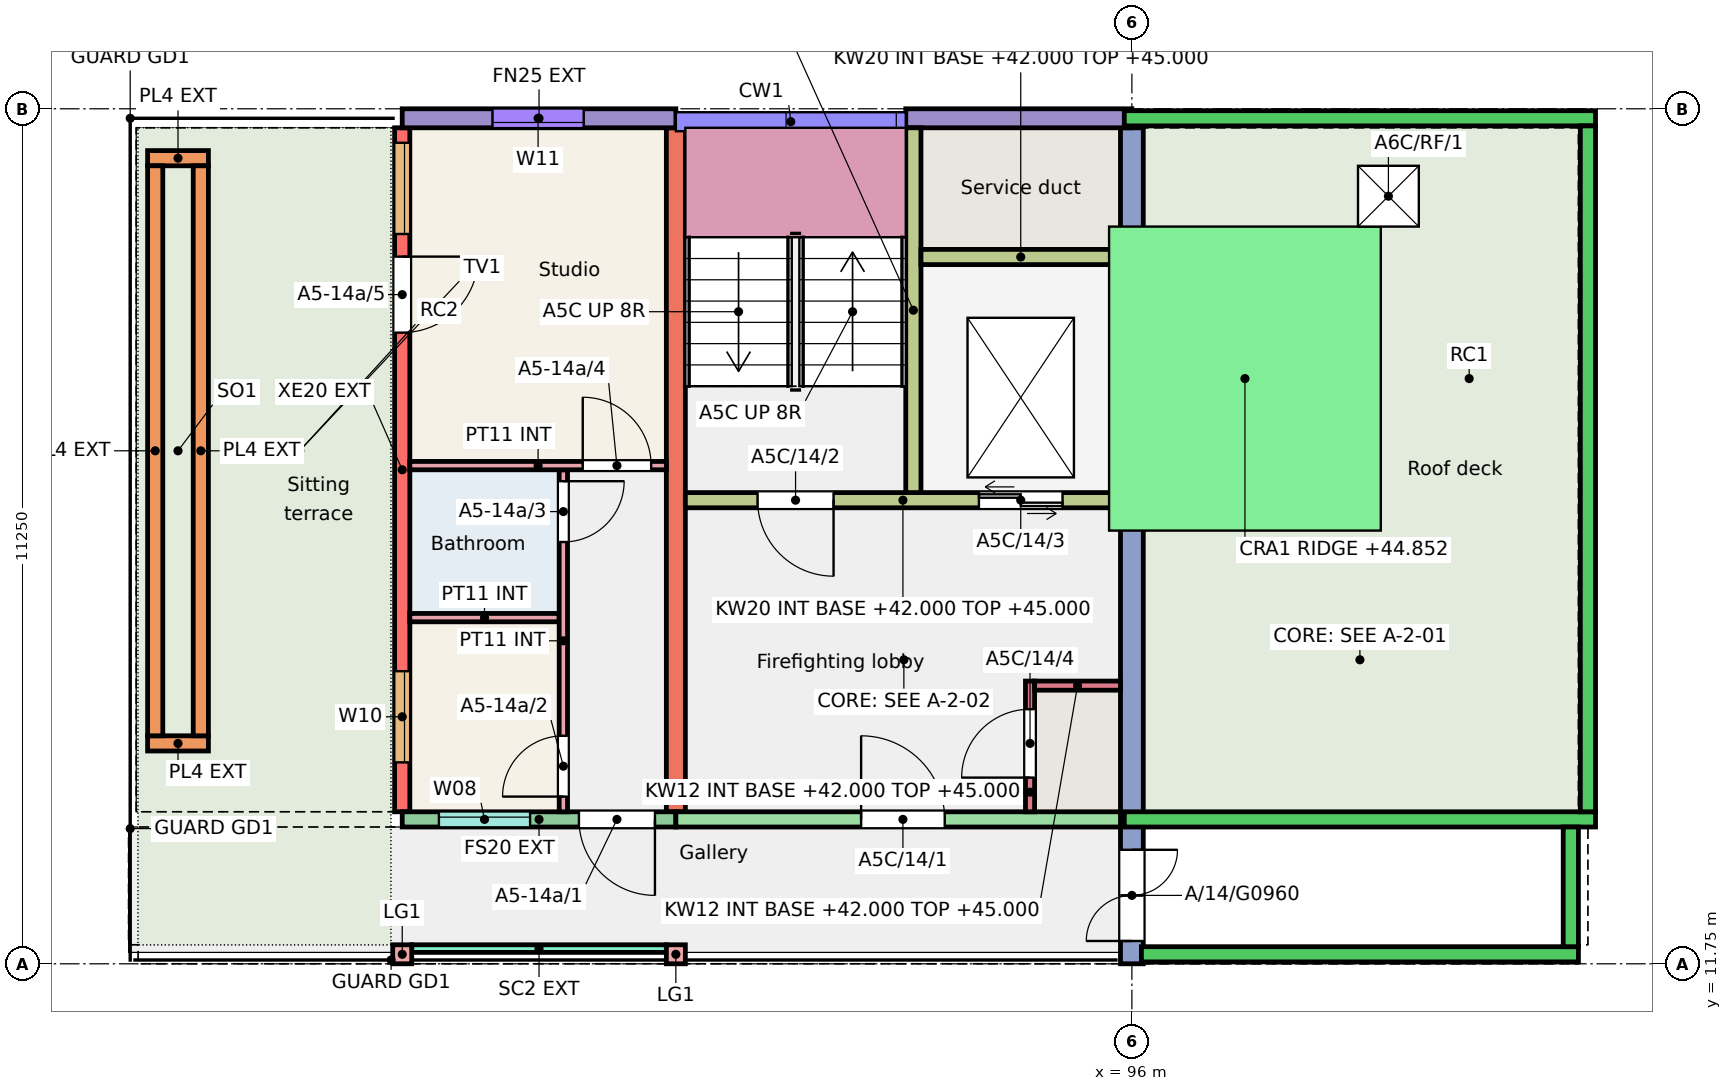
"""IFC4 building model, lengths in metres.
Left out: names, types, materials, properties, quantities, classifications, styles, units other than length and angle.
Written with IfcOpenShell. Run it as: python <this file> out.ifc"""

import sys

from ifc_helpers import new_model, si_unit, direction, frame, frame_2d, origin, origin_2d, place, context, subcontext, project, spatial, rectangle, extrude, element, fill, save


model = new_model("IFC4")
c1 = context("Model", 3, precision=1e-05, world=origin(), true_north=direction((0.0, 1.0)))
c2 = subcontext(c1, "Body", "Model", "MODEL_VIEW")
j1 = project(units=[si_unit("LENGTHUNIT", "METRE"), si_unit("PLANEANGLEUNIT", "RADIAN")], contexts=[c1])
p1 = place(None, origin())
s1 = spatial("IfcSite", under=j1, at=p1, CompositionType="ELEMENT")
p2 = place(p1, origin())
s2 = spatial("IfcBuilding", under=s1, at=p2, CompositionType="ELEMENT")
p3 = place(p2, frame((0.0, 0.0, 42.0)))
s3 = spatial("IfcBuildingStorey", under=s2, at=p3, CompositionType="ELEMENT", Elevation=42.0)
p4 = place(p3, frame((86.4, 13.75, 0.0), z_axis=(0.0, 0.0, 1.0), x_axis=(0.0, 1.0, 0.0)))
e1 = element("IfcWall", 1, at=p4, inside=s3, PredefinedType="SHEAR", context=c2, shape_type="SweptSolid", body=[
    extrude(rectangle(XDim=9.0, YDim=0.2, at=frame_2d((4.5, 0.0))), origin(), (0.0, 0.0, 1.0), 3.0),
])
p5 = place(p4, frame((0.65, 0.0, 0.9)))
e2 = element("IfcOpeningElement", 2, at=p5, cuts=e1, PredefinedType="OPENING", context=c2, shape_type="SweptSolid", body=[
    extrude(rectangle(XDim=1.2, YDim=1.5, at=frame_2d((0.6, 0.75))), frame((0.0, 0.11, 0.0), z_axis=(0.0, -1.0, 0.0), x_axis=(1.0, 0.0, 0.0)), (0.0, 0.0, 1.0), 0.22),
])
p6 = place(p4, frame((7.603, 0.0, 0.9)))
e3 = element("IfcOpeningElement", 3, at=p6, cuts=e1, PredefinedType="OPENING", context=c2, shape_type="SweptSolid", body=[
    extrude(rectangle(XDim=1.2, YDim=1.5, at=frame_2d((0.6, 0.75))), frame((0.0, 0.11, 0.0), z_axis=(0.0, -1.0, 0.0), x_axis=(1.0, 0.0, 0.0)), (0.0, 0.0, 1.0), 0.22),
])
p7 = place(p4, frame((6.305, 0.0, 0.0)))
e4 = element("IfcOpeningElement", 4, at=p7, cuts=e1, PredefinedType="OPENING", context=c2, shape_type="SweptSolid", body=[
    extrude(rectangle(XDim=1.0, YDim=2.1, at=frame_2d((0.5, 1.05))), frame((0.0, 0.11, 0.0), z_axis=(0.0, -1.0, 0.0), x_axis=(1.0, 0.0, 0.0)), (0.0, 0.0, 1.0), 0.22),
])
p8 = place(p3, frame((90.0, 13.75, 0.0), z_axis=(0.0, 0.0, 1.0), x_axis=(0.0, 1.0, 0.0)))
e5 = element("IfcWall", 5, at=p8, inside=s3, PredefinedType="SHEAR", context=c2, shape_type="SweptSolid", body=[
    extrude(rectangle(XDim=9.0, YDim=0.25, at=frame_2d((4.5, 0.0))), origin(), (0.0, 0.0, 1.0), 3.0),
])
p9 = place(p3, frame((96.0, 11.75, 0.0), z_axis=(0.0, 0.0, 1.0), x_axis=(0.0, 1.0, 0.0)))
e6 = element("IfcWall", 6, at=p9, inside=s3, PredefinedType="SHEAR", context=c2, shape_type="SweptSolid", body=[
    extrude(rectangle(XDim=11.0, YDim=0.3, at=frame_2d((5.5, 0.0))), origin(), (0.0, 0.0, 1.0), 3.0),
])
p10 = place(p9, frame((0.3, 0.0, 0.0)))
e7 = element("IfcOpeningElement", 7, at=p10, cuts=e6, PredefinedType="OPENING", context=c2, shape_type="SweptSolid", body=[
    extrude(rectangle(XDim=1.2, YDim=2.1, at=frame_2d((0.6, 1.05))), frame((0.0, 0.16, 0.0), z_axis=(0.0, -1.0, 0.0), x_axis=(1.0, 0.0, 0.0)), (0.0, 0.0, 1.0), 0.32),
])
p11 = place(p3, frame((86.4, 22.875, 0.0), z_axis=(0.0, 0.0, 1.0), x_axis=(1.0, 0.0, 0.0)))
e8 = element("IfcWall", 8, at=p11, inside=s3, PredefinedType="SOLIDWALL", context=c2, shape_type="SweptSolid", body=[
    extrude(rectangle(XDim=3.6, YDim=0.25, at=frame_2d((1.8, 0.0))), origin(), (0.0, 0.0, 1.0), 3.0),
])
p12 = place(p11, frame((1.188, 0.0, 0.8)))
e9 = element("IfcOpeningElement", 9, at=p12, cuts=e8, PredefinedType="OPENING", context=c2, shape_type="SweptSolid", body=[
    extrude(rectangle(XDim=1.2, YDim=1.6, at=frame_2d((0.6, 0.8))), frame((0.0, 0.135, 0.0), z_axis=(0.0, -1.0, 0.0), x_axis=(1.0, 0.0, 0.0)), (0.0, 0.0, 1.0), 0.27),
])
p13 = place(p3, frame((86.4, 13.65, 0.0), z_axis=(0.0, 0.0, 1.0), x_axis=(1.0, 0.0, 0.0)))
e10 = element("IfcWall", 10, at=p13, inside=s3, PredefinedType="SOLIDWALL", context=c2, shape_type="SweptSolid", body=[
    extrude(rectangle(XDim=3.6, YDim=0.2, at=frame_2d((1.8, 0.0))), origin(), (0.0, 0.0, 1.0), 3.0),
])
p14 = place(p13, frame((0.482, 0.0, 1.1)))
e11 = element("IfcOpeningElement", 11, at=p14, cuts=e10, PredefinedType="OPENING", context=c2, shape_type="SweptSolid", body=[
    extrude(rectangle(XDim=1.2, YDim=1.3, at=frame_2d((0.6, 0.65))), frame((0.0, 0.11, 0.0), z_axis=(0.0, -1.0, 0.0), x_axis=(1.0, 0.0, 0.0)), (0.0, 0.0, 1.0), 0.22),
])
p15 = place(p13, frame((2.325, 0.0, 0.0)))
e12 = element("IfcOpeningElement", 12, at=p15, cuts=e10, PredefinedType="OPENING", context=c2, shape_type="SweptSolid", body=[
    extrude(rectangle(XDim=1.0, YDim=2.1, at=frame_2d((0.5, 1.05))), frame((0.0, 0.11, 0.0), z_axis=(0.0, -1.0, 0.0), x_axis=(1.0, 0.0, 0.0)), (0.0, 0.0, 1.0), 0.22),
])
p16 = place(p3, frame((93.025, 22.875, 0.0), z_axis=(0.0, 0.0, 1.0), x_axis=(1.0, 0.0, 0.0)))
e13 = element("IfcWall", 13, at=p16, inside=s3, PredefinedType="SOLIDWALL", context=c2, shape_type="SweptSolid", body=[
    extrude(rectangle(XDim=2.975, YDim=0.25, at=frame_2d((1.488, 0.0))), origin(), (0.0, 0.0, 1.0), 3.0),
])
p17 = place(p3, frame((90.0, 13.65, 0.0), z_axis=(0.0, 0.0, 1.0), x_axis=(1.0, 0.0, 0.0)))
e14 = element("IfcWall", 14, at=p17, inside=s3, PredefinedType="SHEAR", context=c2, shape_type="SweptSolid", body=[
    extrude(rectangle(XDim=5.85, YDim=0.2, at=frame_2d((2.925, 0.0))), origin(), (0.0, 0.0, 1.0), 3.0),
])
p18 = place(p17, frame((2.438, 0.0, 0.0)))
e15 = element("IfcOpeningElement", 15, at=p18, cuts=e14, PredefinedType="OPENING", context=c2, shape_type="SweptSolid", body=[
    extrude(rectangle(XDim=1.1, YDim=2.1, at=frame_2d((0.55, 1.05))), frame((0.0, 0.11, 0.0), z_axis=(0.0, -1.0, 0.0), x_axis=(1.0, 0.0, 0.0)), (0.0, 0.0, 1.0), 0.22),
])
p19 = place(p3, frame((90.125, 17.85, 0.0), z_axis=(0.0, 0.0, 1.0), x_axis=(1.0, 0.0, 0.0)))
e16 = element("IfcWall", 16, at=p19, inside=s3, PredefinedType="SHEAR", context=c2, shape_type="SweptSolid", body=[
    extrude(rectangle(XDim=5.725, YDim=0.2, at=frame_2d((2.863, 0.0))), origin(), (0.0, 0.0, 1.0), 3.0),
])
p20 = place(p19, frame((0.95, 0.0, 0.0)))
e17 = element("IfcOpeningElement", 17, at=p20, cuts=e16, PredefinedType="OPENING", context=c2, shape_type="SweptSolid", body=[
    extrude(rectangle(XDim=1.0, YDim=2.1, at=frame_2d((0.5, 1.05))), frame((0.0, 0.11, 0.0), z_axis=(0.0, -1.0, 0.0), x_axis=(1.0, 0.0, 0.0)), (0.0, 0.0, 1.0), 0.22),
])
p21 = place(p19, frame((3.863, 0.0, 0.0)))
e18 = element("IfcOpeningElement", 18, at=p21, cuts=e16, PredefinedType="OPENING", context=c2, shape_type="SweptSolid", body=[
    extrude(rectangle(XDim=1.1, YDim=2.1, at=frame_2d((0.55, 1.05))), frame((0.0, 0.11, 0.0), z_axis=(0.0, -1.0, 0.0), x_axis=(1.0, 0.0, 0.0)), (0.0, 0.0, 1.0), 0.22),
])
p22 = place(p3, frame((93.125, 17.95, 0.0), z_axis=(0.0, 0.0, 1.0), x_axis=(0.0, 1.0, 0.0)))
e19 = element("IfcWall", 19, at=p22, inside=s3, PredefinedType="SHEAR", context=c2, shape_type="SweptSolid", body=[
    extrude(rectangle(XDim=4.8, YDim=0.2, at=frame_2d((2.4, 0.0))), origin(), (0.0, 0.0, 1.0), 3.0),
])
p23 = place(p3, frame((93.225, 21.05, 0.0), z_axis=(0.0, 0.0, 1.0), x_axis=(1.0, 0.0, 0.0)))
e20 = element("IfcWall", 20, at=p23, inside=s3, PredefinedType="SHEAR", context=c2, shape_type="SweptSolid", body=[
    extrude(rectangle(XDim=2.625, YDim=0.2, at=frame_2d((1.312, 0.0))), origin(), (0.0, 0.0, 1.0), 3.0),
])
p24 = place(p3, frame((94.66, 13.75, 0.0), z_axis=(0.0, 0.0, 1.0), x_axis=(0.0, 1.0, 0.0)))
e21 = element("IfcWall", 21, at=p24, inside=s3, PredefinedType="SHEAR", context=c2, shape_type="SweptSolid", body=[
    extrude(rectangle(XDim=1.72, YDim=0.12, at=frame_2d((0.86, 0.0))), origin(), (0.0, 0.0, 1.0), 3.0),
])
p25 = place(p24, frame((0.45, 0.0, 0.0)))
e22 = element("IfcOpeningElement", 22, at=p25, cuts=e21, PredefinedType="OPENING", context=c2, shape_type="SweptSolid", body=[
    extrude(rectangle(XDim=0.9, YDim=2.1, at=frame_2d((0.45, 1.05))), frame((0.0, 0.07, 0.0), z_axis=(0.0, -1.0, 0.0), x_axis=(1.0, 0.0, 0.0)), (0.0, 0.0, 1.0), 0.14),
])
p26 = place(p3, frame((94.72, 15.41, 0.0), z_axis=(0.0, 0.0, 1.0), x_axis=(1.0, 0.0, 0.0)))
e23 = element("IfcWall", 23, at=p26, inside=s3, PredefinedType="SHEAR", context=c2, shape_type="SweptSolid", body=[
    extrude(rectangle(XDim=1.13, YDim=0.12, at=frame_2d((0.565, 0.0))), origin(), (0.0, 0.0, 1.0), 3.0),
])
for number, where, z_axis, x_axis in (
    (24, (86.4, 11.875, 0.0), (0.0, 0.0, 1.0), (1.0, 0.0, 0.0)),
    (25, (90.0, 11.875, 0.0), (0.0, 0.0, 1.0), (1.0, 0.0, 0.0)),
):
    element("IfcColumn", number, at=place(p3, frame(where, z_axis=z_axis, x_axis=x_axis)), inside=s3, PredefinedType="COLUMN", context=c2, shape_type="SweptSolid", body=[
        extrude(rectangle(XDim=0.25, YDim=0.25, at=origin_2d()), origin(), (0.0, 0.0, 1.0), 3.0),
    ])
for number, where, z_axis, x_axis in (
    (26, (96.15, 17.85, 0.0), (0.0, 0.0, 1.0), (1.0, 0.0, 0.0)),
    (27, (96.15, 21.05, 0.0), (0.0, 0.0, 1.0), (1.0, 0.0, 0.0)),
):
    element("IfcWall", number, at=place(p3, frame(where, z_axis=z_axis, x_axis=x_axis)), inside=s3, PredefinedType="SHEAR", context=c2, shape_type="SweptSolid", body=[
        extrude(rectangle(XDim=2.825, YDim=0.2, at=frame_2d((1.413, 0.0))), origin(), (0.0, 0.0, 1.0), 1.5),
    ])
p27 = place(p3, frame((98.875, 17.95, 0.0), z_axis=(0.0, 0.0, 1.0), x_axis=(0.0, 1.0, 0.0)))
e28 = element("IfcWall", 28, at=p27, inside=s3, PredefinedType="SHEAR", context=c2, shape_type="SweptSolid", body=[
    extrude(rectangle(XDim=3.0, YDim=0.2, at=frame_2d((1.5, 0.0))), origin(), (0.0, 0.0, 1.0), 1.5),
])
for number, where, z_axis, x_axis in (
    (29, (95.9, 22.875, 0.0), (0.0, 0.0, 1.0), (1.0, 0.0, 0.0)),
    (30, (95.9, 13.65, 0.0), (0.0, 0.0, 1.0), (1.0, 0.0, 0.0)),
):
    element("IfcWall", number, at=place(p3, frame(where, z_axis=z_axis, x_axis=x_axis)), inside=s3, PredefinedType="PARAPET", context=c2, shape_type="SweptSolid", body=[
        extrude(rectangle(XDim=6.2, YDim=0.2, at=frame_2d((3.1, 0.0))), origin(), (0.0, 0.0, 1.0), 1.1),
    ])
p28 = place(p3, frame((102.0, 13.75, 0.0), z_axis=(0.0, 0.0, 1.0), x_axis=(0.0, 1.0, 0.0)))
e31 = element("IfcWall", 31, at=p28, inside=s3, PredefinedType="PARAPET", context=c2, shape_type="SweptSolid", body=[
    extrude(rectangle(XDim=9.025, YDim=0.2, at=frame_2d((4.512, 0.0))), origin(), (0.0, 0.0, 1.0), 1.1),
])
p29 = place(p3, frame((96.125, 11.875, 0.0), z_axis=(0.0, 0.0, 1.0), x_axis=(1.0, 0.0, 0.0)))
e32 = element("IfcWall", 32, at=p29, inside=s3, PredefinedType="PARAPET", context=c2, shape_type="SweptSolid", body=[
    extrude(rectangle(XDim=5.75, YDim=0.2, at=frame_2d((2.875, 0.0))), origin(), (0.0, 0.0, 1.0), 1.1),
])
p30 = place(p3, frame((101.775, 11.975, 0.0), z_axis=(0.0, 0.0, 1.0), x_axis=(0.0, 1.0, 0.0)))
e33 = element("IfcWall", 33, at=p30, inside=s3, PredefinedType="PARAPET", context=c2, shape_type="SweptSolid", body=[
    extrude(rectangle(XDim=1.575, YDim=0.2, at=frame_2d((0.788, 0.0))), origin(), (0.0, 0.0, 1.0), 1.1),
])
for number, where, z_axis, x_axis in (
    (34, (83.05, 14.65, 0.01), (0.0, 0.0, 1.0), (1.0, 0.0, 0.0)),
    (35, (83.05, 22.35, 0.01), (0.0, 0.0, 1.0), (1.0, 0.0, 0.0)),
):
    element("IfcWall", number, at=place(p3, frame(where, z_axis=z_axis, x_axis=x_axis)), inside=s3, PredefinedType="SOLIDWALL", context=c2, shape_type="SweptSolid", body=[
        extrude(rectangle(XDim=0.8, YDim=0.2, at=frame_2d((0.4, 0.0))), origin(), (0.0, 0.0, 1.0), 0.45),
    ])
for number, where, z_axis, x_axis in (
    (36, (83.15, 14.75, 0.01), (0.0, 0.0, 1.0), (0.0, 1.0, 0.0)),
    (37, (83.75, 14.75, 0.01), (0.0, 0.0, 1.0), (0.0, 1.0, 0.0)),
):
    element("IfcWall", number, at=place(p3, frame(where, z_axis=z_axis, x_axis=x_axis)), inside=s3, PredefinedType="SOLIDWALL", context=c2, shape_type="SweptSolid", body=[
        extrude(rectangle(XDim=7.5, YDim=0.2, at=frame_2d((3.75, 0.0))), origin(), (0.0, 0.0, 1.0), 0.45),
    ])
p31 = place(p3, frame((86.525, 11.95, 0.0), z_axis=(0.0, 0.0, 1.0), x_axis=(1.0, 0.0, 0.0)))
e38 = element("IfcWall", 38, at=p31, inside=s3, PredefinedType="SOLIDWALL", context=c2, shape_type="SweptSolid", body=[
    extrude(rectangle(XDim=3.35, YDim=0.1, at=frame_2d((1.675, 0.0))), origin(), (0.0, 0.0, 1.0), 2.45),
])
p32 = place(p3, frame((86.5, 16.305, 0.0), z_axis=(0.0, 0.0, 1.0), x_axis=(1.0, 0.0, 0.0)))
e39 = element("IfcWall", 39, at=p32, inside=s3, PredefinedType="PARTITIONING", context=c2, shape_type="SweptSolid", body=[
    extrude(rectangle(XDim=1.965, YDim=0.11, at=frame_2d((0.982, 0.0))), origin(), (0.0, 0.0, 1.0), 2.75),
])
p33 = place(p3, frame((88.52, 13.75, 0.0), z_axis=(0.0, 0.0, 1.0), x_axis=(0.0, 1.0, 0.0)))
e40 = element("IfcWall", 40, at=p33, inside=s3, PredefinedType="PARTITIONING", context=c2, shape_type="SweptSolid", body=[
    extrude(rectangle(XDim=4.5, YDim=0.11, at=frame_2d((2.25, 0.0))), origin(), (0.0, 0.0, 1.0), 2.75),
])
p34 = place(p33, frame((0.2, 0.0, 0.0)))
e41 = element("IfcOpeningElement", 41, at=p34, cuts=e40, PredefinedType="OPENING", context=c2, shape_type="SweptSolid", body=[
    extrude(rectangle(XDim=0.8, YDim=2.1, at=frame_2d((0.4, 1.05))), frame((0.0, 0.065, 0.0), z_axis=(0.0, -1.0, 0.0), x_axis=(1.0, 0.0, 0.0)), (0.0, 0.0, 1.0), 0.13),
])
p35 = place(p33, frame((3.55, 0.0, 0.0)))
e42 = element("IfcOpeningElement", 42, at=p35, cuts=e40, PredefinedType="OPENING", context=c2, shape_type="SweptSolid", body=[
    extrude(rectangle(XDim=0.8, YDim=2.1, at=frame_2d((0.4, 1.05))), frame((0.0, 0.065, 0.0), z_axis=(0.0, -1.0, 0.0), x_axis=(1.0, 0.0, 0.0)), (0.0, 0.0, 1.0), 0.13),
])
p36 = place(p3, frame((86.5, 18.305, 0.0), z_axis=(0.0, 0.0, 1.0), x_axis=(1.0, 0.0, 0.0)))
e43 = element("IfcWall", 43, at=p36, inside=s3, PredefinedType="PARTITIONING", context=c2, shape_type="SweptSolid", body=[
    extrude(rectangle(XDim=3.375, YDim=0.11, at=frame_2d((1.688, 0.0))), origin(), (0.0, 0.0, 1.0), 2.75),
])
p37 = place(p36, frame((2.275, 0.0, 0.0)))
e44 = element("IfcOpeningElement", 44, at=p37, cuts=e43, PredefinedType="OPENING", context=c2, shape_type="SweptSolid", body=[
    extrude(rectangle(XDim=0.9, YDim=2.1, at=frame_2d((0.45, 1.05))), frame((0.0, 0.065, 0.0), z_axis=(0.0, -1.0, 0.0), x_axis=(1.0, 0.0, 0.0)), (0.0, 0.0, 1.0), 0.13),
])
p38 = place(p3, frame((0.0, 0.0, -0.25)))
p39 = place(p38, frame((99.375, 21.85, 0.0)))
p40 = place(p39, frame((0.0, 0.0, 0.2)))
e45 = element("IfcDoor", 45, at=p40, inside=s3, OperationType="SINGLE_SWING_LEFT", PredefinedType="TRAPDOOR", context=c2, shape_type="SweptSolid", body=[
    extrude(rectangle(XDim=0.8, YDim=0.8, at=origin_2d()), origin(), (0.0, 0.0, 1.0), 0.05),
])
p41 = place(p14, origin())
e46 = element("IfcWindow", 46, at=p41, inside=s3, PartitioningType="SINGLE_PANEL", PredefinedType="WINDOW", context=c2, shape_type="SweptSolid", body=[
    extrude(rectangle(XDim=1.2, YDim=1.3, at=frame_2d((0.6, 0.65))), frame((0.0, 0.06, 0.0), z_axis=(0.0, -1.0, 0.0), x_axis=(1.0, 0.0, 0.0)), (0.0, 0.0, 1.0), 0.06),
])
fill(e11, e46)
p42 = place(p12, origin())
e47 = element("IfcWindow", 47, at=p42, inside=s3, PartitioningType="SINGLE_PANEL", PredefinedType="WINDOW", context=c2, shape_type="SweptSolid", body=[
    extrude(rectangle(XDim=1.2, YDim=1.6, at=frame_2d((0.6, 0.8))), frame((0.0, -0.025, 0.0), z_axis=(0.0, -1.0, 0.0), x_axis=(1.0, 0.0, 0.0)), (0.0, 0.0, 1.0), 0.06),
])
fill(e9, e47)
p43 = place(p5, origin())
e48 = element("IfcWindow", 48, at=p43, inside=s3, PartitioningType="SINGLE_PANEL", PredefinedType="WINDOW", context=c2, shape_type="SweptSolid", body=[
    extrude(rectangle(XDim=1.2, YDim=1.5, at=frame_2d((0.6, 0.75))), frame((0.0, 0.0, 0.0), z_axis=(0.0, -1.0, 0.0), x_axis=(1.0, 0.0, 0.0)), (0.0, 0.0, 1.0), 0.06),
])
fill(e2, e48)
p44 = place(p6, origin())
e49 = element("IfcWindow", 49, at=p44, inside=s3, PartitioningType="SINGLE_PANEL", PredefinedType="WINDOW", context=c2, shape_type="SweptSolid", body=[
    extrude(rectangle(XDim=1.2, YDim=1.5, at=frame_2d((0.6, 0.75))), frame((0.0, 0.0, 0.0), z_axis=(0.0, -1.0, 0.0), x_axis=(1.0, 0.0, 0.0)), (0.0, 0.0, 1.0), 0.06),
])
fill(e3, e49)
p45 = place(p15, origin())
e50 = element("IfcDoor", 50, at=p45, inside=s3, OperationType="SINGLE_SWING_RIGHT", PredefinedType="DOOR", context=c2, shape_type="SweptSolid", body=[
    extrude(rectangle(XDim=1.0, YDim=2.1, at=frame_2d((0.5, 1.05))), frame((0.0, 0.025, 0.0), z_axis=(0.0, -1.0, 0.0), x_axis=(1.0, 0.0, 0.0)), (0.0, 0.0, 1.0), 0.05),
])
fill(e12, e50)
p46 = place(p34, origin())
e51 = element("IfcDoor", 51, at=p46, inside=s3, OperationType="SINGLE_SWING_LEFT", PredefinedType="DOOR", context=c2, shape_type="SweptSolid", body=[
    extrude(rectangle(XDim=0.8, YDim=2.1, at=frame_2d((0.4, 1.05))), frame((0.0, 0.025, 0.0), z_axis=(0.0, -1.0, 0.0), x_axis=(1.0, 0.0, 0.0)), (0.0, 0.0, 1.0), 0.05),
])
fill(e41, e51)
p47 = place(p35, origin())
e52 = element("IfcDoor", 52, at=p47, inside=s3, OperationType="SINGLE_SWING_RIGHT", PredefinedType="DOOR", context=c2, shape_type="SweptSolid", body=[
    extrude(rectangle(XDim=0.8, YDim=2.1, at=frame_2d((0.4, 1.05))), frame((0.0, 0.025, 0.0), z_axis=(0.0, -1.0, 0.0), x_axis=(1.0, 0.0, 0.0)), (0.0, 0.0, 1.0), 0.05),
])
fill(e42, e52)
p48 = place(p37, origin())
e53 = element("IfcDoor", 53, at=p48, inside=s3, OperationType="SINGLE_SWING_LEFT", PredefinedType="DOOR", context=c2, shape_type="SweptSolid", body=[
    extrude(rectangle(XDim=0.9, YDim=2.1, at=frame_2d((0.45, 1.05))), frame((0.0, 0.025, 0.0), z_axis=(0.0, -1.0, 0.0), x_axis=(1.0, 0.0, 0.0)), (0.0, 0.0, 1.0), 0.05),
])
fill(e44, e53)
p49 = place(p7, origin())
e54 = element("IfcDoor", 54, at=p49, inside=s3, OperationType="SINGLE_SWING_RIGHT", PredefinedType="DOOR", context=c2, shape_type="SweptSolid", body=[
    extrude(rectangle(XDim=1.0, YDim=2.1, at=frame_2d((0.5, 1.05))), frame((0.0, 0.025, 0.0), z_axis=(0.0, -1.0, 0.0), x_axis=(1.0, 0.0, 0.0)), (0.0, 0.0, 1.0), 0.05),
])
fill(e4, e54)
p50 = place(p18, origin())
e55 = element("IfcDoor", 55, at=p50, inside=s3, OperationType="SINGLE_SWING_LEFT", PredefinedType="DOOR", context=c2, shape_type="SweptSolid", body=[
    extrude(rectangle(XDim=1.1, YDim=2.1, at=frame_2d((0.55, 1.05))), frame((0.0, 0.025, 0.0), z_axis=(0.0, -1.0, 0.0), x_axis=(1.0, 0.0, 0.0)), (0.0, 0.0, 1.0), 0.05),
])
fill(e15, e55)
p51 = place(p20, origin())
e56 = element("IfcDoor", 56, at=p51, inside=s3, OperationType="SINGLE_SWING_RIGHT", PredefinedType="DOOR", context=c2, shape_type="SweptSolid", body=[
    extrude(rectangle(XDim=1.0, YDim=2.1, at=frame_2d((0.5, 1.05))), frame((0.0, 0.025, 0.0), z_axis=(0.0, -1.0, 0.0), x_axis=(1.0, 0.0, 0.0)), (0.0, 0.0, 1.0), 0.05),
])
fill(e17, e56)
p52 = place(p21, origin())
e57 = element("IfcDoor", 57, at=p52, inside=s3, OperationType="DOUBLE_DOOR_SLIDING", PredefinedType="DOOR", context=c2, shape_type="SweptSolid", body=[
    extrude(rectangle(XDim=1.1, YDim=2.1, at=frame_2d((0.55, 1.05))), frame((0.0, 0.025, 0.0), z_axis=(0.0, -1.0, 0.0), x_axis=(1.0, 0.0, 0.0)), (0.0, 0.0, 1.0), 0.05),
])
fill(e18, e57)
p53 = place(p25, origin())
e58 = element("IfcDoor", 58, at=p53, inside=s3, OperationType="SINGLE_SWING_LEFT", PredefinedType="DOOR", context=c2, shape_type="SweptSolid", body=[
    extrude(rectangle(XDim=0.9, YDim=2.1, at=frame_2d((0.45, 1.05))), frame((0.0, 0.025, 0.0), z_axis=(0.0, -1.0, 0.0), x_axis=(1.0, 0.0, 0.0)), (0.0, 0.0, 1.0), 0.05),
])
fill(e22, e58)
p54 = place(p10, origin())
e59 = element("IfcDoor", 59, at=p54, inside=s3, OperationType="DOUBLE_DOOR_SINGLE_SWING", PredefinedType="DOOR", context=c2, shape_type="SweptSolid", body=[
    extrude(rectangle(XDim=1.2, YDim=2.1, at=frame_2d((0.6, 1.05))), frame((0.0, 0.025, 0.0), z_axis=(0.0, -1.0, 0.0), x_axis=(1.0, 0.0, 0.0)), (0.0, 0.0, 1.0), 0.05),
])
fill(e7, e59)
save(model, sys.argv[1])
